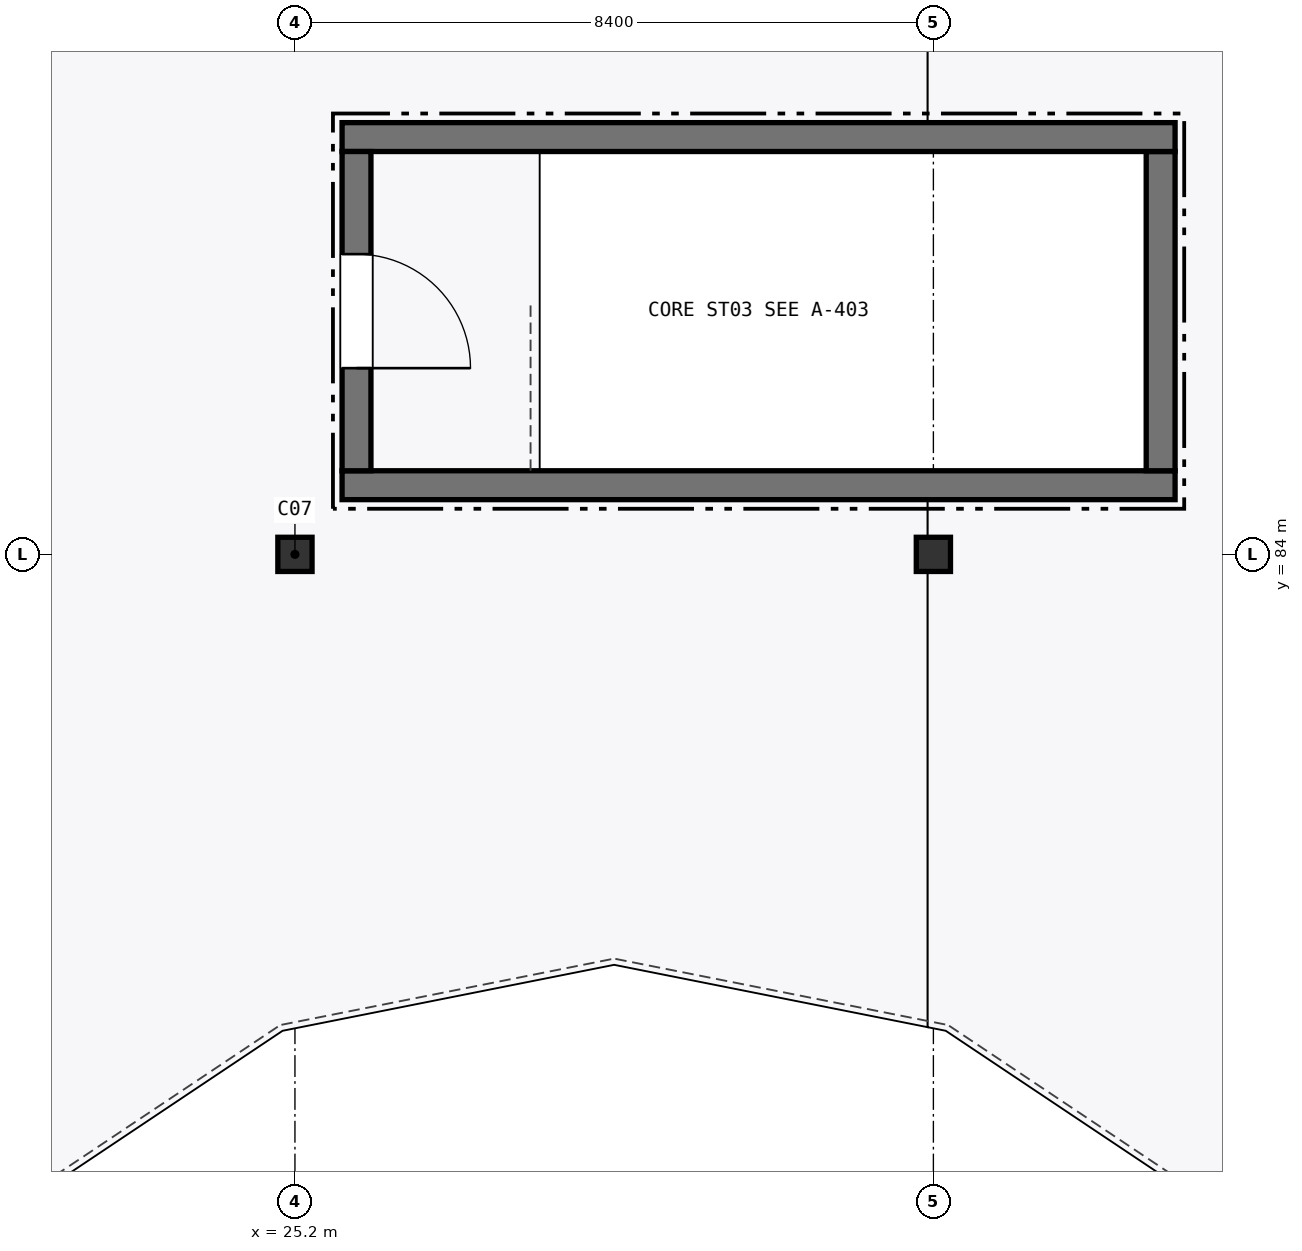
"""IFC4 building model, lengths in metres.
Left out: names, types, materials, properties, quantities, classifications, styles, units other than length and angle.
Written with IfcOpenShell. Run it as: python <this file> out.ifc"""

import sys

from ifc_helpers import new_model, si_unit, direction, frame, frame_2d, origin, origin_2d, place, context, subcontext, project, spatial, rectangle, hollow_rectangle, extrude, element, fill, save


model = new_model("IFC4")
c1 = context("Model", 3, precision=1e-05, world=origin(), true_north=direction((0.0, 1.0)))
c2 = subcontext(c1, "Body", "Model", "MODEL_VIEW")
j1 = project(units=[si_unit("LENGTHUNIT", "METRE"), si_unit("PLANEANGLEUNIT", "RADIAN")], contexts=[c1])
p1 = place(None, origin())
s1 = spatial("IfcSite", under=j1, at=p1, CompositionType="ELEMENT")
p2 = place(p1, origin())
s2 = spatial("IfcBuilding", under=s1, at=p2, CompositionType="ELEMENT")
p3 = place(p2, frame((0.0, 0.0, 26.7)))
s3 = spatial("IfcBuildingStorey", under=s2, at=p3, CompositionType="ELEMENT", Elevation=26.7)
for number, where, z_axis, x_axis in (
    (1, (25.2, 84.0, 0.0), (0.0, 0.0, 1.0), (1.0, 0.0, 0.0)),
    (2, (33.6, 84.0, 0.0), (0.0, 0.0, 1.0), (1.0, 0.0, 0.0)),
):
    element("IfcColumn", number, at=place(p3, frame(where, z_axis=z_axis, x_axis=x_axis)), inside=s3, PredefinedType="COLUMN", context=c2, shape_type="SweptSolid", body=[
        extrude(hollow_rectangle(XDim=0.45, YDim=0.45, WallThickness=0.018, at=origin_2d()), origin(), (0.0, 0.0, 1.0), 5.1),
    ])
p4 = place(p3, frame((25.82, 84.91, 0.0), z_axis=(0.0, 0.0, 1.0), x_axis=(1.0, 0.0, 0.0)))
e3 = element("IfcWall", 3, at=p4, inside=s3, PredefinedType="SHEAR", context=c2, shape_type="SweptSolid", body=[
    extrude(rectangle(XDim=10.96, YDim=0.38, at=frame_2d((5.48, 0.0))), origin(), (0.0, 0.0, 1.0), 4.845),
])
p5 = place(p3, frame((36.59, 85.1, 0.0), z_axis=(0.0, 0.0, 1.0), x_axis=(0.0, 1.0, 0.0)))
e4 = element("IfcWall", 4, at=p5, inside=s3, PredefinedType="SHEAR", context=c2, shape_type="SweptSolid", body=[
    extrude(rectangle(XDim=4.2, YDim=0.38, at=frame_2d((2.1, 0.0))), origin(), (0.0, 0.0, 1.0), 4.845),
])
p6 = place(p3, frame((36.78, 89.49, 0.0), z_axis=(0.0, 0.0, 1.0), x_axis=(-1.0, 0.0, 0.0)))
e5 = element("IfcWall", 5, at=p6, inside=s3, PredefinedType="SHEAR", context=c2, shape_type="SweptSolid", body=[
    extrude(rectangle(XDim=10.96, YDim=0.38, at=frame_2d((5.48, 0.0))), origin(), (0.0, 0.0, 1.0), 4.845),
])
p7 = place(p3, frame((26.01, 89.3, 0.0), z_axis=(0.0, 0.0, 1.0), x_axis=(0.0, -1.0, 0.0)))
e6 = element("IfcWall", 6, at=p7, inside=s3, PredefinedType="SHEAR", context=c2, shape_type="SweptSolid", body=[
    extrude(rectangle(XDim=4.2, YDim=0.38, at=frame_2d((2.1, 0.0))), origin(), (0.0, 0.0, 1.0), 4.845),
])
p8 = place(p7, frame((1.35, 0.0, 0.0)))
e7 = element("IfcOpeningElement", 7, at=p8, cuts=e6, PredefinedType="OPENING", context=c2, shape_type="SweptSolid", body=[
    extrude(rectangle(XDim=1.5, YDim=2.15, at=frame_2d((0.75, 1.075))), frame((0.0, 0.2, 0.0), z_axis=(0.0, -1.0, 0.0), x_axis=(1.0, 0.0, 0.0)), (0.0, 0.0, 1.0), 0.4),
])
p9 = place(p8, origin())
e8 = element("IfcDoor", 8, at=p9, inside=s3, OperationType="SINGLE_SWING_RIGHT", PredefinedType="DOOR", context=c2, shape_type="SweptSolid", body=[
    extrude(rectangle(XDim=1.5, YDim=2.15, at=frame_2d((0.75, 1.075))), frame((0.0, 0.025, 0.0), z_axis=(0.0, -1.0, 0.0), x_axis=(1.0, 0.0, 0.0)), (0.0, 0.0, 1.0), 0.05),
])
fill(e7, e8)
save(model, sys.argv[1])
